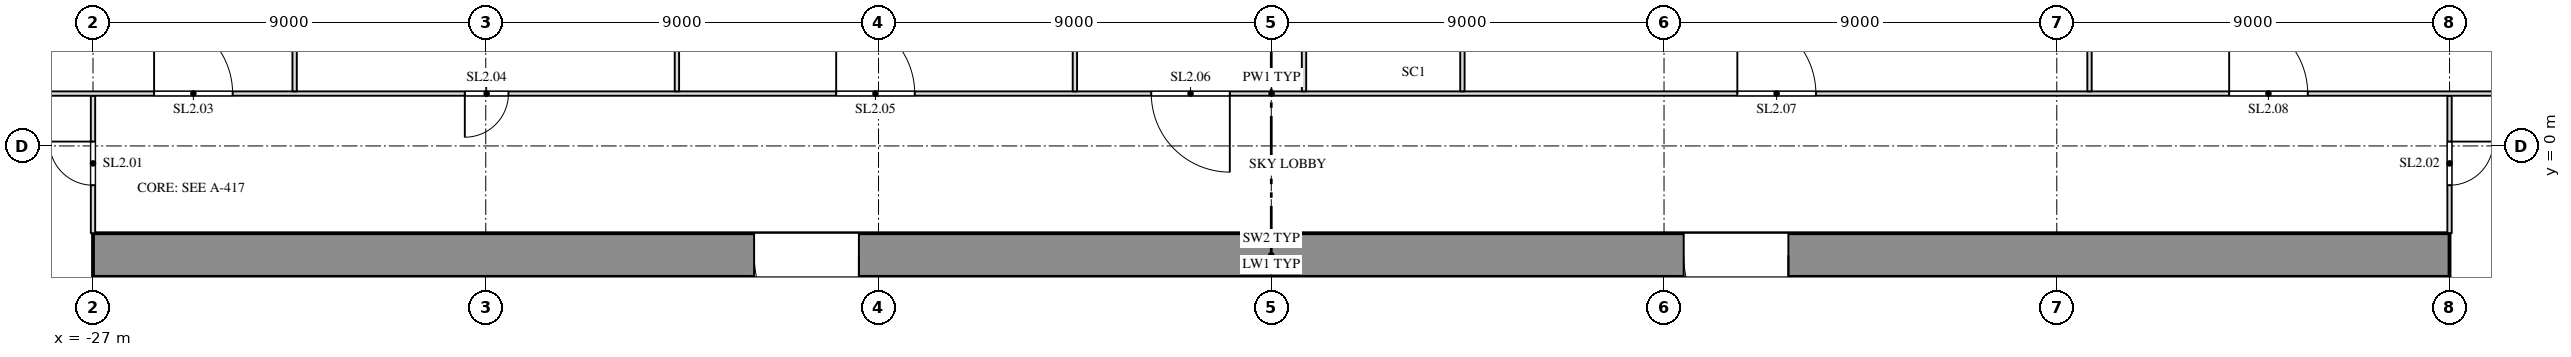
"""IFC4 building model, lengths in metres.
Left out: names, types, materials, properties, quantities, classifications, styles, units other than length and angle.
Written with IfcOpenShell. Run it as: python <this file> out.ifc"""

import sys

from ifc_helpers import new_model, si_unit, direction, frame, frame_2d, origin, place, context, subcontext, project, spatial, rectangle, extrude, element, fill, save


model = new_model("IFC4")
c1 = context("Model", 3, precision=1e-05, world=origin(), true_north=direction((0.0, 1.0)))
c2 = subcontext(c1, "Body", "Model", "MODEL_VIEW")
j1 = project(units=[si_unit("LENGTHUNIT", "METRE"), si_unit("PLANEANGLEUNIT", "RADIAN")], contexts=[c1])
p1 = place(None, origin())
s1 = spatial("IfcSite", under=j1, at=p1, CompositionType="ELEMENT")
p2 = place(p1, origin())
s2 = spatial("IfcBuilding", under=s1, at=p2, CompositionType="ELEMENT")
p3 = place(p2, frame((0.0, 0.0, 156.5)))
s3 = spatial("IfcBuildingStorey", under=s2, at=p3, CompositionType="ELEMENT", Elevation=156.5)
p4 = place(p3, frame((-27.0, -2.5, 0.0), z_axis=(0.0, 0.0, 1.0), x_axis=(1.0, 0.0, 0.0)))
e1 = element("IfcWall", 1, at=p4, inside=s3, PredefinedType="SHEAR", context=c2, shape_type="SweptSolid", body=[
    extrude(rectangle(XDim=54.0, YDim=1.0, at=frame_2d((27.0, 0.0))), origin(), (0.0, 0.0, 1.0), 3.65),
])
p5 = place(p4, frame((15.15, 0.0, 0.0)))
e2 = element("IfcOpeningElement", 2, at=p5, cuts=e1, PredefinedType="OPENING", context=c2, shape_type="SweptSolid", body=[
    extrude(rectangle(XDim=2.4, YDim=2.1, at=frame_2d((1.2, 1.05))), frame((0.0, 0.512, 0.0), z_axis=(0.0, -1.0, 0.0), x_axis=(1.0, 0.0, 0.0)), (0.0, 0.0, 1.0), 1.024),
])
p6 = place(p4, frame((36.45, 0.0, 0.0)))
e3 = element("IfcOpeningElement", 3, at=p6, cuts=e1, PredefinedType="OPENING", context=c2, shape_type="SweptSolid", body=[
    extrude(rectangle(XDim=2.4, YDim=2.1, at=frame_2d((1.2, 1.05))), frame((0.0, 0.512, 0.0), z_axis=(0.0, -1.0, 0.0), x_axis=(1.0, 0.0, 0.0)), (0.0, 0.0, 1.0), 1.024),
])
p7 = place(p3, frame((-27.0, -2.0, 0.0), z_axis=(0.0, 0.0, 1.0), x_axis=(0.0, 1.0, 0.0)))
e4 = element("IfcWall", 4, at=p7, inside=s3, PredefinedType="PARTITIONING", context=c2, shape_type="SweptSolid", body=[
    extrude(rectangle(XDim=3.15, YDim=0.1, at=frame_2d((1.575, 0.0))), origin(), (0.0, 0.0, 1.0), 3.038),
])
p8 = place(p7, frame((1.1, 0.0, 0.0)))
e5 = element("IfcOpeningElement", 5, at=p8, cuts=e4, PredefinedType="OPENING", context=c2, shape_type="SweptSolid", body=[
    extrude(rectangle(XDim=1.0, YDim=2.1, at=frame_2d((0.5, 1.05))), frame((0.0, 0.062, 0.0), z_axis=(0.0, -1.0, 0.0), x_axis=(1.0, 0.0, 0.0)), (0.0, 0.0, 1.0), 0.124),
])
p9 = place(p3, frame((27.0, -2.0, 0.0), z_axis=(0.0, 0.0, 1.0), x_axis=(0.0, 1.0, 0.0)))
e6 = element("IfcWall", 6, at=p9, inside=s3, PredefinedType="PARTITIONING", context=c2, shape_type="SweptSolid", body=[
    extrude(rectangle(XDim=3.15, YDim=0.1, at=frame_2d((1.575, 0.0))), origin(), (0.0, 0.0, 1.0), 3.038),
])
p10 = place(p9, frame((1.1, 0.0, 0.0)))
e7 = element("IfcOpeningElement", 7, at=p10, cuts=e6, PredefinedType="OPENING", context=c2, shape_type="SweptSolid", body=[
    extrude(rectangle(XDim=1.0, YDim=2.1, at=frame_2d((0.5, 1.05))), frame((0.0, 0.062, 0.0), z_axis=(0.0, -1.0, 0.0), x_axis=(1.0, 0.0, 0.0)), (0.0, 0.0, 1.0), 0.124),
])
p11 = place(p3, frame((-33.98, 1.2, 0.0), z_axis=(0.0, 0.0, 1.0), x_axis=(1.0, 0.0, 0.0)))
e8 = element("IfcWall", 8, at=p11, inside=s3, PredefinedType="PARTITIONING", context=c2, shape_type="SweptSolid", body=[
    extrude(rectangle(XDim=67.976, YDim=0.1, at=frame_2d((33.988, 0.0))), origin(), (0.0, 0.0, 1.0), 3.65),
])
p12 = place(p11, frame((8.38, 0.0, 0.0)))
e9 = element("IfcOpeningElement", 9, at=p12, cuts=e8, PredefinedType="OPENING", context=c2, shape_type="SweptSolid", body=[
    extrude(rectangle(XDim=1.8, YDim=2.1, at=frame_2d((0.9, 1.05))), frame((0.0, 0.062, 0.0), z_axis=(0.0, -1.0, 0.0), x_axis=(1.0, 0.0, 0.0)), (0.0, 0.0, 1.0), 0.124),
])
p13 = place(p11, frame((15.5, 0.0, 0.0)))
e10 = element("IfcOpeningElement", 10, at=p13, cuts=e8, PredefinedType="OPENING", context=c2, shape_type="SweptSolid", body=[
    extrude(rectangle(XDim=1.0, YDim=2.1, at=frame_2d((0.5, 1.05))), frame((0.0, 0.062, 0.0), z_axis=(0.0, -1.0, 0.0), x_axis=(1.0, 0.0, 0.0)), (0.0, 0.0, 1.0), 0.124),
])
p14 = place(p11, frame((24.01, 0.0, 0.0)))
e11 = element("IfcOpeningElement", 11, at=p14, cuts=e8, PredefinedType="OPENING", context=c2, shape_type="SweptSolid", body=[
    extrude(rectangle(XDim=1.8, YDim=2.1, at=frame_2d((0.9, 1.05))), frame((0.0, 0.062, 0.0), z_axis=(0.0, -1.0, 0.0), x_axis=(1.0, 0.0, 0.0)), (0.0, 0.0, 1.0), 0.124),
])
p15 = place(p11, frame((31.23, 0.0, 0.0)))
e12 = element("IfcOpeningElement", 12, at=p15, cuts=e8, PredefinedType="OPENING", context=c2, shape_type="SweptSolid", body=[
    extrude(rectangle(XDim=1.8, YDim=2.1, at=frame_2d((0.9, 1.05))), frame((0.0, 0.062, 0.0), z_axis=(0.0, -1.0, 0.0), x_axis=(1.0, 0.0, 0.0)), (0.0, 0.0, 1.0), 0.124),
])
p16 = place(p11, frame((44.66, 0.0, 0.0)))
e13 = element("IfcOpeningElement", 13, at=p16, cuts=e8, PredefinedType="OPENING", context=c2, shape_type="SweptSolid", body=[
    extrude(rectangle(XDim=1.8, YDim=2.1, at=frame_2d((0.9, 1.05))), frame((0.0, 0.062, 0.0), z_axis=(0.0, -1.0, 0.0), x_axis=(1.0, 0.0, 0.0)), (0.0, 0.0, 1.0), 0.124),
])
p17 = place(p11, frame((55.93, 0.0, 0.0)))
e14 = element("IfcOpeningElement", 14, at=p17, cuts=e8, PredefinedType="OPENING", context=c2, shape_type="SweptSolid", body=[
    extrude(rectangle(XDim=1.8, YDim=2.1, at=frame_2d((0.9, 1.05))), frame((0.0, 0.062, 0.0), z_axis=(0.0, -1.0, 0.0), x_axis=(1.0, 0.0, 0.0)), (0.0, 0.0, 1.0), 0.124),
])
p18 = place(p3, frame((-22.38, 1.25, 0.0), z_axis=(0.0, 0.0, 1.0), x_axis=(0.0, 1.0, 0.0)))
e15 = element("IfcWall", 15, at=p18, inside=s3, PredefinedType="PARTITIONING", context=c2, shape_type="SweptSolid", body=[
    extrude(rectangle(XDim=18.73, YDim=0.1, at=frame_2d((9.365, 0.0))), origin(), (0.0, 0.0, 1.0), 3.65),
])
p19 = place(p18, frame((13.23, 0.0, 0.0)))
e16 = element("IfcOpeningElement", 16, at=p19, cuts=e15, PredefinedType="OPENING", context=c2, shape_type="SweptSolid", body=[
    extrude(rectangle(XDim=1.0, YDim=2.1, at=frame_2d((0.5, 1.05))), frame((0.0, 0.062, 0.0), z_axis=(0.0, -1.0, 0.0), x_axis=(1.0, 0.0, 0.0)), (0.0, 0.0, 1.0), 0.124),
])
p20 = place(p3, frame((-13.62, 1.25, 0.0), z_axis=(0.0, 0.0, 1.0), x_axis=(0.0, 1.0, 0.0)))
e17 = element("IfcWall", 17, at=p20, inside=s3, PredefinedType="PARTITIONING", context=c2, shape_type="SweptSolid", body=[
    extrude(rectangle(XDim=18.73, YDim=0.1, at=frame_2d((9.365, 0.0))), origin(), (0.0, 0.0, 1.0), 3.65),
])
p21 = place(p3, frame((-4.5, 1.25, 0.0), z_axis=(0.0, 0.0, 1.0), x_axis=(0.0, 1.0, 0.0)))
e18 = element("IfcWall", 18, at=p21, inside=s3, PredefinedType="PARTITIONING", context=c2, shape_type="SweptSolid", body=[
    extrude(rectangle(XDim=18.82, YDim=0.1, at=frame_2d((9.41, 0.0))), origin(), (0.0, 0.0, 1.0), 3.65),
])
p22 = place(p3, frame((0.75, 1.25, 0.0), z_axis=(0.0, 0.0, 1.0), x_axis=(0.0, 1.0, 0.0)))
e19 = element("IfcWall", 19, at=p22, inside=s3, PredefinedType="PARTITIONING", context=c2, shape_type="SweptSolid", body=[
    extrude(rectangle(XDim=18.73, YDim=0.1, at=frame_2d((9.365, 0.0))), origin(), (0.0, 0.0, 1.0), 3.65),
])
p23 = place(p22, frame((3.9, 0.0, 0.0)))
e20 = element("IfcOpeningElement", 20, at=p23, cuts=e19, PredefinedType="OPENING", context=c2, shape_type="SweptSolid", body=[
    extrude(rectangle(XDim=0.9, YDim=2.1, at=frame_2d((0.45, 1.05))), frame((0.0, 0.062, 0.0), z_axis=(0.0, -1.0, 0.0), x_axis=(1.0, 0.0, 0.0)), (0.0, 0.0, 1.0), 0.124),
])
p24 = place(p22, frame((13.33, 0.0, 0.0)))
e21 = element("IfcOpeningElement", 21, at=p24, cuts=e19, PredefinedType="OPENING", context=c2, shape_type="SweptSolid", body=[
    extrude(rectangle(XDim=0.9, YDim=2.1, at=frame_2d((0.45, 1.05))), frame((0.0, 0.062, 0.0), z_axis=(0.0, -1.0, 0.0), x_axis=(1.0, 0.0, 0.0)), (0.0, 0.0, 1.0), 0.124),
])
for number, where, z_axis, x_axis in (
    (22, (4.38, 1.25, 0.0), (0.0, 0.0, 1.0), (0.0, 1.0, 0.0)),
    (23, (18.75, 1.25, 0.0), (0.0, 0.0, 1.0), (0.0, 1.0, 0.0)),
):
    element("IfcWall", number, at=place(p3, frame(where, z_axis=z_axis, x_axis=x_axis)), inside=s3, PredefinedType="PARTITIONING", context=c2, shape_type="SweptSolid", body=[
        extrude(rectangle(XDim=18.73, YDim=0.1, at=frame_2d((9.365, 0.0))), origin(), (0.0, 0.0, 1.0), 3.65),
    ])
p25 = place(p8, origin())
e24 = element("IfcDoor", 24, at=p25, inside=s3, OperationType="SINGLE_SWING_RIGHT", PredefinedType="DOOR", context=c2, shape_type="SweptSolid", body=[
    extrude(rectangle(XDim=1.0, YDim=2.1, at=frame_2d((0.5, 1.05))), frame((0.0, 0.025, 0.0), z_axis=(0.0, -1.0, 0.0), x_axis=(1.0, 0.0, 0.0)), (0.0, 0.0, 1.0), 0.05),
])
fill(e5, e24)
p26 = place(p10, origin())
e25 = element("IfcDoor", 25, at=p26, inside=s3, OperationType="SINGLE_SWING_LEFT", PredefinedType="DOOR", context=c2, shape_type="SweptSolid", body=[
    extrude(rectangle(XDim=1.0, YDim=2.1, at=frame_2d((0.5, 1.05))), frame((0.0, 0.025, 0.0), z_axis=(0.0, -1.0, 0.0), x_axis=(1.0, 0.0, 0.0)), (0.0, 0.0, 1.0), 0.05),
])
fill(e7, e25)
p27 = place(p12, origin())
e26 = element("IfcDoor", 26, at=p27, inside=s3, OperationType="DOUBLE_DOOR_SINGLE_SWING", PredefinedType="DOOR", context=c2, shape_type="SweptSolid", body=[
    extrude(rectangle(XDim=1.8, YDim=2.1, at=frame_2d((0.9, 1.05))), frame((0.0, 0.025, 0.0), z_axis=(0.0, -1.0, 0.0), x_axis=(1.0, 0.0, 0.0)), (0.0, 0.0, 1.0), 0.05),
])
fill(e9, e26)
p28 = place(p13, origin())
e27 = element("IfcDoor", 27, at=p28, inside=s3, OperationType="SINGLE_SWING_RIGHT", PredefinedType="DOOR", context=c2, shape_type="SweptSolid", body=[
    extrude(rectangle(XDim=1.0, YDim=2.1, at=frame_2d((0.5, 1.05))), frame((0.0, 0.025, 0.0), z_axis=(0.0, -1.0, 0.0), x_axis=(1.0, 0.0, 0.0)), (0.0, 0.0, 1.0), 0.05),
])
fill(e10, e27)
p29 = place(p14, origin())
e28 = element("IfcDoor", 28, at=p29, inside=s3, OperationType="DOUBLE_DOOR_SINGLE_SWING", PredefinedType="DOOR", context=c2, shape_type="SweptSolid", body=[
    extrude(rectangle(XDim=1.8, YDim=2.1, at=frame_2d((0.9, 1.05))), frame((0.0, 0.025, 0.0), z_axis=(0.0, -1.0, 0.0), x_axis=(1.0, 0.0, 0.0)), (0.0, 0.0, 1.0), 0.05),
])
fill(e11, e28)
p30 = place(p15, origin())
e29 = element("IfcDoor", 29, at=p30, inside=s3, OperationType="DOUBLE_DOOR_SINGLE_SWING", PredefinedType="DOOR", context=c2, shape_type="SweptSolid", body=[
    extrude(rectangle(XDim=1.8, YDim=2.1, at=frame_2d((0.9, 1.05))), frame((0.0, 0.025, 0.0), z_axis=(0.0, -1.0, 0.0), x_axis=(1.0, 0.0, 0.0)), (0.0, 0.0, 1.0), 0.05),
])
fill(e12, e29)
p31 = place(p16, origin())
e30 = element("IfcDoor", 30, at=p31, inside=s3, OperationType="DOUBLE_DOOR_SINGLE_SWING", PredefinedType="DOOR", context=c2, shape_type="SweptSolid", body=[
    extrude(rectangle(XDim=1.8, YDim=2.1, at=frame_2d((0.9, 1.05))), frame((0.0, 0.025, 0.0), z_axis=(0.0, -1.0, 0.0), x_axis=(1.0, 0.0, 0.0)), (0.0, 0.0, 1.0), 0.05),
])
fill(e13, e30)
p32 = place(p17, origin())
e31 = element("IfcDoor", 31, at=p32, inside=s3, OperationType="DOUBLE_DOOR_SINGLE_SWING", PredefinedType="DOOR", context=c2, shape_type="SweptSolid", body=[
    extrude(rectangle(XDim=1.8, YDim=2.1, at=frame_2d((0.9, 1.05))), frame((0.0, 0.025, 0.0), z_axis=(0.0, -1.0, 0.0), x_axis=(1.0, 0.0, 0.0)), (0.0, 0.0, 1.0), 0.05),
])
fill(e14, e31)
p33 = place(p5, origin())
e32 = element("IfcDoor", 32, at=p33, inside=s3, OperationType="DOUBLE_DOOR_SINGLE_SWING", PredefinedType="DOOR", context=c2, shape_type="SweptSolid", body=[
    extrude(rectangle(XDim=2.4, YDim=2.1, at=frame_2d((1.2, 1.05))), frame((0.0, 0.025, 0.0), z_axis=(0.0, -1.0, 0.0), x_axis=(1.0, 0.0, 0.0)), (0.0, 0.0, 1.0), 0.05),
])
fill(e2, e32)
p34 = place(p6, origin())
e33 = element("IfcDoor", 33, at=p34, inside=s3, OperationType="DOUBLE_DOOR_SINGLE_SWING", PredefinedType="DOOR", context=c2, shape_type="SweptSolid", body=[
    extrude(rectangle(XDim=2.4, YDim=2.1, at=frame_2d((1.2, 1.05))), frame((0.0, 0.025, 0.0), z_axis=(0.0, -1.0, 0.0), x_axis=(1.0, 0.0, 0.0)), (0.0, 0.0, 1.0), 0.05),
])
fill(e3, e33)
save(model, sys.argv[1])
